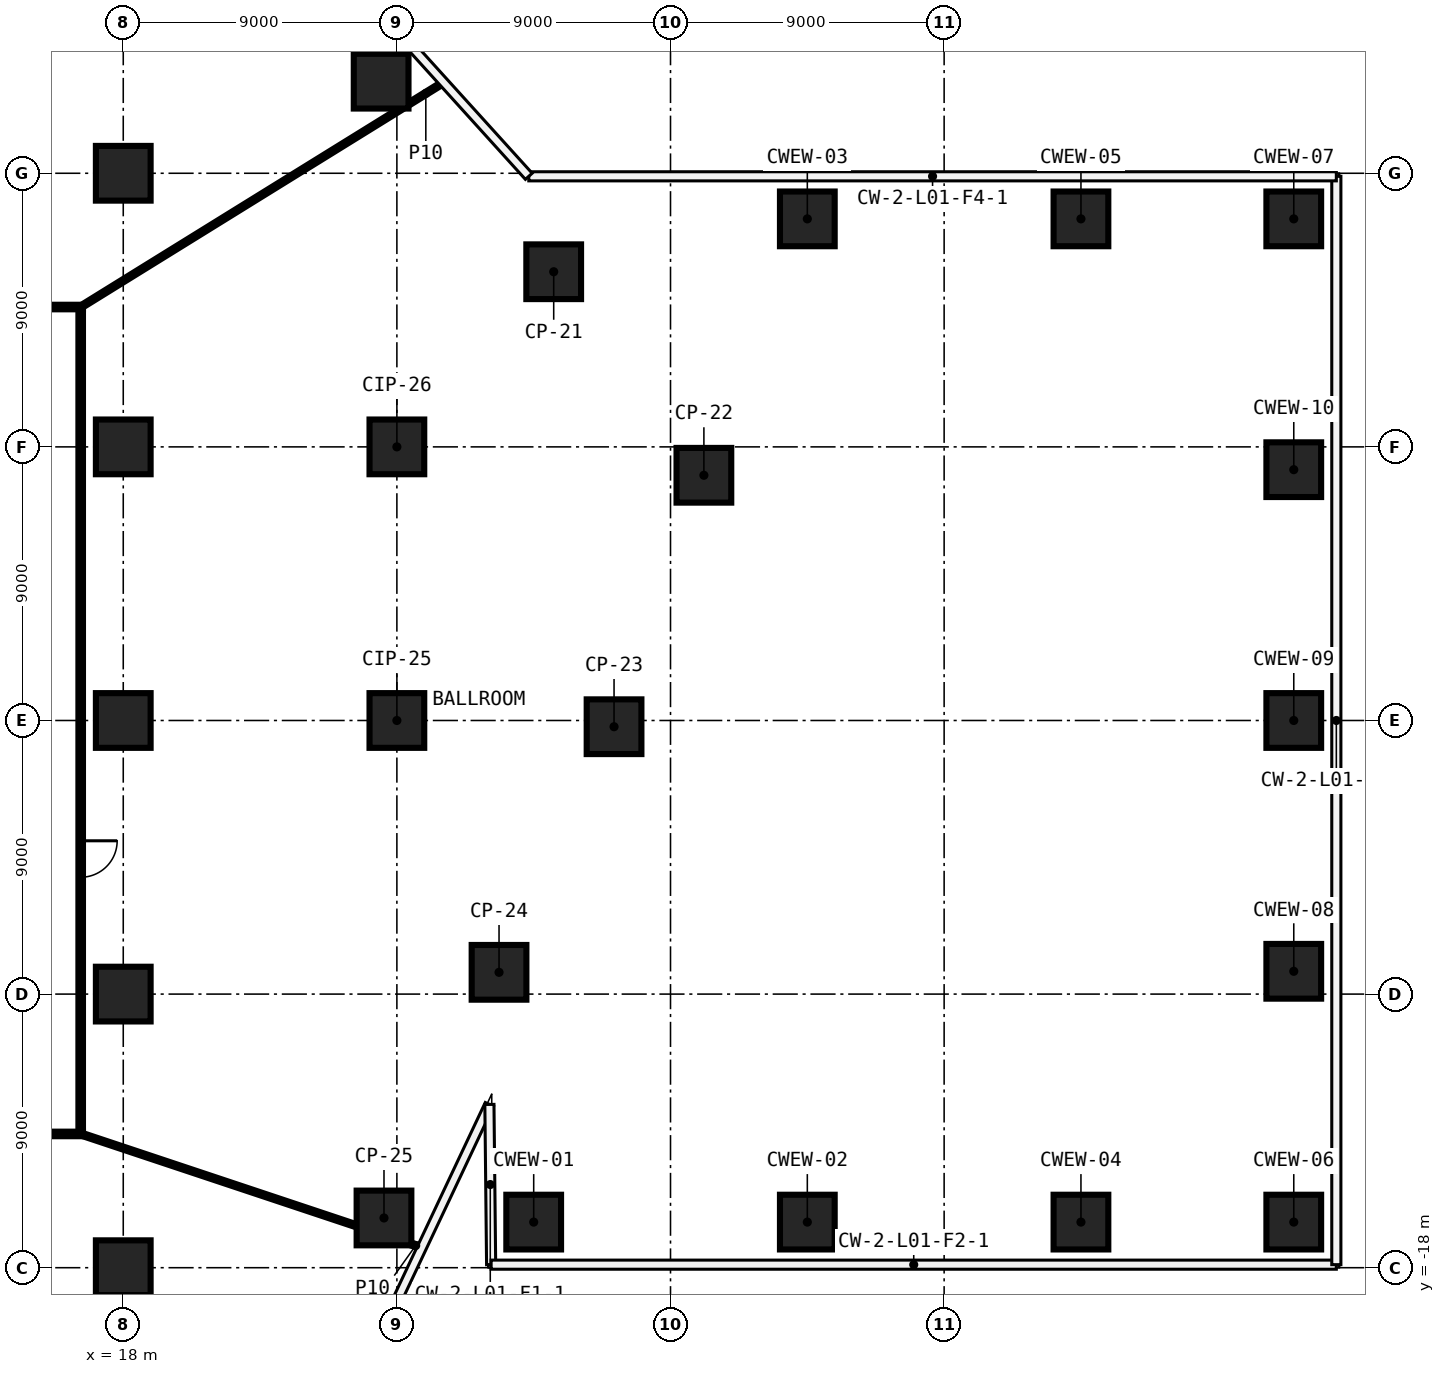
"""IFC4 building model, lengths in metres.
Left out: names, types, materials, properties, quantities, classifications, styles, units other than length and angle.
Written with IfcOpenShell. Run it as: python <this file> out.ifc"""

import sys

from ifc_helpers import new_model, si_unit, direction, frame, frame_2d, origin, origin_2d, place, context, subcontext, project, spatial, rectangle, extrude, element, fill, save


model = new_model("IFC4")
c1 = context("Model", 3, precision=1e-05, world=origin(), true_north=direction((0.0, 1.0)))
c2 = subcontext(c1, "Body", "Model", "MODEL_VIEW")
j1 = project(units=[si_unit("LENGTHUNIT", "METRE"), si_unit("PLANEANGLEUNIT", "RADIAN")], contexts=[c1])
p1 = place(None, origin())
s1 = spatial("IfcSite", under=j1, at=p1, CompositionType="ELEMENT")
p2 = place(p1, origin())
s2 = spatial("IfcBuilding", under=s1, at=p2, CompositionType="ELEMENT")
p3 = place(p2, origin())
s3 = spatial("IfcBuildingStorey", under=s2, at=p3, CompositionType="ELEMENT", Elevation=0.0)
for number, where, z_axis, x_axis in (
    (1, (40.5, -8.25, 0.0), (0.0, 0.0, 1.0), (1.0, 0.0, 0.0)),
    (2, (40.5, 0.0, 0.0), (0.0, 0.0, 1.0), (1.0, 0.0, 0.0)),
    (3, (40.5, 4.7, 0.0), (0.0, 0.0, 1.0), (1.0, 0.0, 0.0)),
    (4, (49.5, -8.25, 0.0), (0.0, 0.0, 1.0), (1.0, 0.0, 0.0)),
    (5, (49.5, 0.0, 0.0), (0.0, 0.0, 1.0), (1.0, 0.0, 0.0)),
    (6, (49.5, 4.7, 0.0), (0.0, 0.0, 1.0), (1.0, 0.0, 0.0)),
):
    element("IfcColumn", number, at=place(p3, frame(where, z_axis=z_axis, x_axis=x_axis)), inside=s3, PredefinedType="COLUMN", context=c2, shape_type="SweptSolid", body=[
        extrude(rectangle(XDim=1.8, YDim=1.8, at=origin_2d()), origin(), (0.0, 0.0, 1.0), 18.7),
    ])
p4 = place(p2, frame((0.0, 0.0, 9.0)))
s4 = spatial("IfcBuildingStorey", under=s2, at=p4, CompositionType="ELEMENT", Elevation=9.0)
for number, where, z_axis, x_axis in (
    (7, (26.482, 21.029, 0.0), (0.0, 0.0, 1.0), (1.0, 0.0, 0.0)),
    (8, (32.158, 14.761, 0.0), (0.0, 0.0, 1.0), (1.0, 0.0, 0.0)),
    (9, (37.098, 8.066, 0.0), (0.0, 0.0, 1.0), (1.0, 0.0, 0.0)),
    (10, (34.143, -0.205, 0.0), (0.0, 0.0, 1.0), (1.0, 0.0, 0.0)),
    (11, (30.36, -8.284, 0.0), (0.0, 0.0, 1.0), (1.0, 0.0, 0.0)),
    (12, (26.576, -16.364, 0.0), (0.0, 0.0, 1.0), (1.0, 0.0, 0.0)),
    (13, (18.0, -18.0, 0.0), (0.0, 0.0, 1.0), (1.0, 0.0, 0.0)),
    (14, (18.0, -9.0, 0.0), (0.0, 0.0, 1.0), (1.0, 0.0, 0.0)),
    (15, (18.0, 0.0, 0.0), (0.0, 0.0, 1.0), (1.0, 0.0, 0.0)),
    (16, (18.0, 9.0, 0.0), (0.0, 0.0, 1.0), (1.0, 0.0, 0.0)),
    (17, (18.0, 18.0, 0.0), (0.0, 0.0, 1.0), (1.0, 0.0, 0.0)),
    (18, (27.0, 0.0, 0.0), (0.0, 0.0, 1.0), (1.0, 0.0, 0.0)),
    (19, (27.0, 9.0, 0.0), (0.0, 0.0, 1.0), (1.0, 0.0, 0.0)),
):
    element("IfcColumn", number, at=place(p4, frame(where, z_axis=z_axis, x_axis=x_axis)), inside=s4, PredefinedType="COLUMN", context=c2, shape_type="SweptSolid", body=[
        extrude(rectangle(XDim=1.8, YDim=1.8, at=origin_2d()), origin(), (0.0, 0.0, 1.0), 9.55),
    ])
for number, where, z_axis, x_axis in (
    (20, (31.5, -16.5, 0.0), (0.0, 0.0, 1.0), (1.0, 0.0, 0.0)),
    (21, (40.5, -16.5, 0.0), (0.0, 0.0, 1.0), (1.0, 0.0, 0.0)),
    (22, (40.5, 16.5, 0.0), (0.0, 0.0, 1.0), (1.0, 0.0, 0.0)),
    (23, (49.5, -16.5, 0.0), (0.0, 0.0, 1.0), (1.0, 0.0, 0.0)),
    (24, (49.5, 16.5, 0.0), (0.0, 0.0, 1.0), (1.0, 0.0, 0.0)),
    (25, (56.5, -16.5, 0.0), (0.0, 0.0, 1.0), (1.0, 0.0, 0.0)),
    (26, (56.5, 16.5, 0.0), (0.0, 0.0, 1.0), (1.0, 0.0, 0.0)),
    (27, (56.5, -8.25, 0.0), (0.0, 0.0, 1.0), (1.0, 0.0, 0.0)),
    (28, (56.5, 0.0, 0.0), (0.0, 0.0, 1.0), (1.0, 0.0, 0.0)),
    (29, (56.5, 8.25, 0.0), (0.0, 0.0, 1.0), (1.0, 0.0, 0.0)),
):
    element("IfcColumn", number, at=place(p4, frame(where, z_axis=z_axis, x_axis=x_axis)), inside=s4, PredefinedType="COLUMN", context=c2, shape_type="SweptSolid", body=[
        extrude(rectangle(XDim=1.8, YDim=1.8, at=origin_2d()), origin(), (0.0, 0.0, 1.0), 9.7),
    ])
p5 = place(p4, frame((16.675, -13.6, 0.0), z_axis=(0.0, 0.0, 1.0), x_axis=(-1.0, 0.0, 0.0)))
e30 = element("IfcWall", 30, at=p5, inside=s4, PredefinedType="PARTITIONING", context=c2, shape_type="SweptSolid", body=[
    extrude(rectangle(XDim=33.35, YDim=0.15, at=frame_2d((16.675, 0.0))), origin(), (0.0, 0.0, 1.0), 9.55),
])
p6 = place(p5, frame((25.853, 0.0, 0.0)))
e31 = element("IfcOpeningElement", 31, at=p6, cuts=e30, PredefinedType="OPENING", context=c2, shape_type="SweptSolid", body=[
    extrude(rectangle(XDim=1.2, YDim=2.1, at=frame_2d((0.6, 1.05))), frame((0.0, 0.085, 0.0), z_axis=(0.0, -1.0, 0.0), x_axis=(1.0, 0.0, 0.0)), (0.0, 0.0, 1.0), 0.17),
])
p7 = place(p5, frame((14.742, 0.0, 0.0)))
e32 = element("IfcOpeningElement", 32, at=p7, cuts=e30, PredefinedType="OPENING", context=c2, shape_type="SweptSolid", body=[
    extrude(rectangle(XDim=1.2, YDim=2.1, at=frame_2d((0.6, 1.05))), frame((0.0, 0.085, 0.0), z_axis=(0.0, -1.0, 0.0), x_axis=(1.0, 0.0, 0.0)), (0.0, 0.0, 1.0), 0.17),
])
p8 = place(p5, frame((1.764, 0.0, 0.0)))
e33 = element("IfcOpeningElement", 33, at=p8, cuts=e30, PredefinedType="OPENING", context=c2, shape_type="SweptSolid", body=[
    extrude(rectangle(XDim=1.2, YDim=2.1, at=frame_2d((0.6, 1.05))), frame((0.0, 0.085, 0.0), z_axis=(0.0, -1.0, 0.0), x_axis=(1.0, 0.0, 0.0)), (0.0, 0.0, 1.0), 0.17),
])
p9 = place(p4, frame((-16.675, 13.6, 0.0), z_axis=(0.0, 0.0, 1.0), x_axis=(1.0, 0.0, 0.0)))
e34 = element("IfcWall", 34, at=p9, inside=s4, PredefinedType="PARTITIONING", context=c2, shape_type="SweptSolid", body=[
    extrude(rectangle(XDim=33.35, YDim=0.15, at=frame_2d((16.675, 0.0))), origin(), (0.0, 0.0, 1.0), 9.55),
])
p10 = place(p9, frame((27.447, 0.0, 0.0)))
e35 = element("IfcOpeningElement", 35, at=p10, cuts=e34, PredefinedType="OPENING", context=c2, shape_type="SweptSolid", body=[
    extrude(rectangle(XDim=1.2, YDim=2.1, at=frame_2d((0.6, 1.05))), frame((0.0, 0.085, 0.0), z_axis=(0.0, -1.0, 0.0), x_axis=(1.0, 0.0, 0.0)), (0.0, 0.0, 1.0), 0.17),
])
p11 = place(p9, frame((19.346, 0.0, 0.0)))
e36 = element("IfcOpeningElement", 36, at=p11, cuts=e34, PredefinedType="OPENING", context=c2, shape_type="SweptSolid", body=[
    extrude(rectangle(XDim=1.2, YDim=2.1, at=frame_2d((0.6, 1.05))), frame((0.0, 0.085, 0.0), z_axis=(0.0, -1.0, 0.0), x_axis=(1.0, 0.0, 0.0)), (0.0, 0.0, 1.0), 0.17),
])
p12 = place(p4, frame((16.6, 13.6, 0.0), z_axis=(0.0, 0.0, 1.0), x_axis=(0.850261790898, 0.526360035469, 0.0)))
e37 = element("IfcWall", 37, at=p12, inside=s4, PredefinedType="PARTITIONING", context=c2, shape_type="SweptSolid", body=[
    extrude(rectangle(XDim=12.404, YDim=0.1, at=frame_2d((6.202, 0.0))), origin(), (0.0, 0.0, 1.0), 9.55),
])
p13 = place(p4, frame((27.382, 20.275, 0.0), z_axis=(0.0, 0.0, 1.0), x_axis=(0.850241855485, 0.526392237008, 0.0)))
e38 = element("IfcWall", 38, at=p13, inside=s4, PredefinedType="PARTITIONING", context=c2, shape_type="SweptSolid", body=[
    extrude(rectangle(XDim=1.34, YDim=0.1, at=frame_2d((0.67, 0.0))), origin(), (0.0, 0.0, 1.0), 9.55),
])
p14 = place(p4, frame((16.6, 13.525, 0.0), z_axis=(0.0, 0.0, 1.0), x_axis=(0.0, -1.0, 0.0)))
e39 = element("IfcWall", 39, at=p14, inside=s4, PredefinedType="PARTITIONING", context=c2, shape_type="SweptSolid", body=[
    extrude(rectangle(XDim=27.05, YDim=0.15, at=frame_2d((13.525, 0.0))), origin(), (0.0, 0.0, 1.0), 9.55),
])
p15 = place(p14, frame((17.482, 0.0, 0.0)))
e40 = element("IfcOpeningElement", 40, at=p15, cuts=e39, PredefinedType="OPENING", context=c2, shape_type="SweptSolid", body=[
    extrude(rectangle(XDim=1.2, YDim=2.1, at=frame_2d((0.6, 1.05))), frame((0.0, 0.085, 0.0), z_axis=(0.0, -1.0, 0.0), x_axis=(1.0, 0.0, 0.0)), (0.0, 0.0, 1.0), 0.17),
])
p16 = place(p4, frame((16.6, -13.6, 0.0), z_axis=(0.0, 0.0, 1.0), x_axis=(0.948711366471, -0.316143548294, 0.0)))
e41 = element("IfcWall", 41, at=p16, inside=s4, PredefinedType="PARTITIONING", context=c2, shape_type="SweptSolid", body=[
    extrude(rectangle(XDim=9.567, YDim=0.1, at=frame_2d((4.783, 0.0))), origin(), (0.0, 0.0, 1.0), 9.55),
])
p17 = place(p4, frame((27.476, -17.224, 0.0), z_axis=(0.0, 0.0, 1.0), x_axis=(0.948845092647, -0.31574196769, 0.0)))
e42 = element("IfcWall", 42, at=p17, inside=s4, PredefinedType="PARTITIONING", context=c2, shape_type="SweptSolid", body=[
    extrude(rectangle(XDim=0.302, YDim=0.1, at=frame_2d((0.151, 0.0))), origin(), (0.0, 0.0, 1.0), 9.55),
])
p18 = place(p15, origin())
e43 = element("IfcDoor", 43, at=p18, inside=s4, OperationType="SINGLE_SWING_LEFT", PredefinedType="DOOR", context=c2, shape_type="SweptSolid", body=[
    extrude(rectangle(XDim=1.2, YDim=2.1, at=frame_2d((0.6, 1.05))), frame((0.0, 0.025, 0.0), z_axis=(0.0, -1.0, 0.0), x_axis=(1.0, 0.0, 0.0)), (0.0, 0.0, 1.0), 0.05),
])
fill(e40, e43)
save(model, sys.argv[1])
